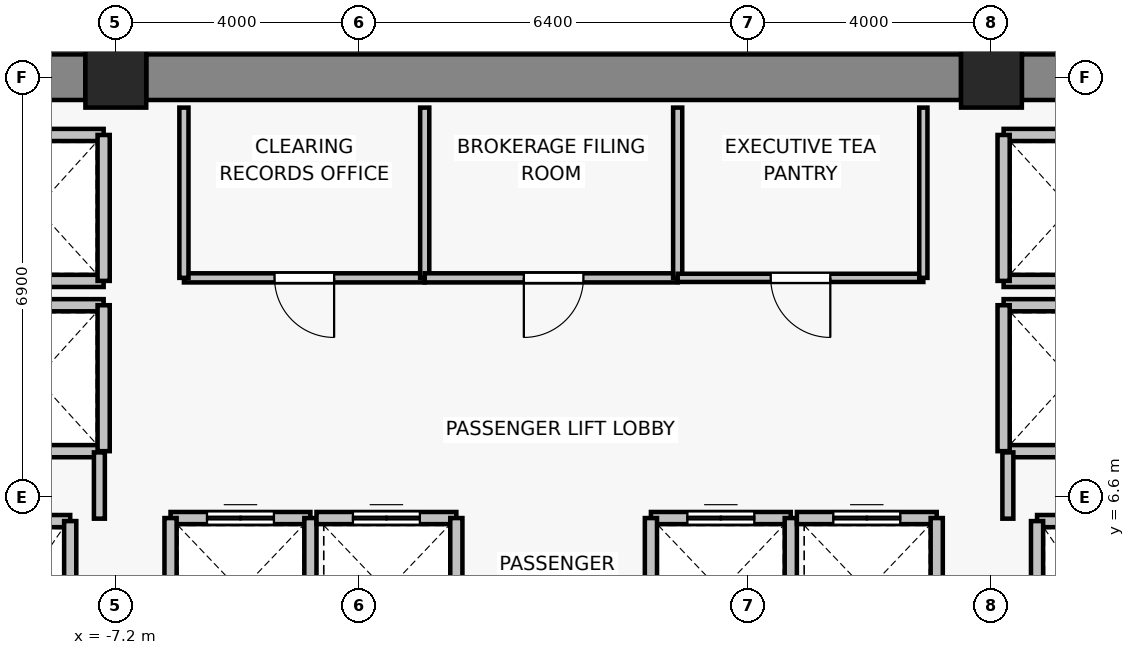
"""IFC4 building model, lengths in metres.
Left out: names, types, materials, properties, quantities, classifications, styles, units other than length and angle.
Written with IfcOpenShell. Run it as: python <this file> out.ifc"""

import sys

from ifc_helpers import new_model, si_unit, direction, frame, frame_2d, origin, origin_2d, place, context, subcontext, project, spatial, rectangle, extrude, source, transform, mapped, element, fill, save


model = new_model("IFC4")
c1 = context("Model", 3, precision=1e-05, world=origin(), true_north=direction((0.0, 1.0)))
c2 = subcontext(c1, "Body", "Model", "MODEL_VIEW")
j1 = project(units=[si_unit("LENGTHUNIT", "METRE"), si_unit("PLANEANGLEUNIT", "RADIAN")], contexts=[c1])
p1 = place(None, origin())
s1 = spatial("IfcSite", under=j1, at=p1, CompositionType="ELEMENT")
p2 = place(p1, origin())
s2 = spatial("IfcBuilding", under=s1, at=p2, CompositionType="ELEMENT")
p3 = place(p2, frame((0.0, 0.0, 119.8)))
s3 = spatial("IfcBuildingStorey", under=s2, at=p3, CompositionType="ELEMENT", Elevation=119.8)
for number, where, z_axis, x_axis in (
    (1, (-7.2, 13.5, 0.0), (0.0, 0.0, 1.0), (1.0, 0.0, 0.0)),
    (2, (7.2, 13.5, 0.0), (0.0, 0.0, 1.0), (1.0, 0.0, 0.0)),
):
    element("IfcColumn", number, at=place(p3, frame(where, z_axis=z_axis, x_axis=x_axis)), inside=s3, PredefinedType="COLUMN", context=c2, shape_type="SweptSolid", body=[
        extrude(rectangle(XDim=1.0, YDim=1.0, at=origin_2d()), origin(), (0.0, 0.0, 1.0), 3.3),
    ])
p4 = place(p3, frame((-13.9, 13.5, 0.0), z_axis=(0.0, 0.0, 1.0), x_axis=(1.0, 0.0, 0.0)))
e3 = element("IfcWall", 3, at=p4, inside=s3, PredefinedType="SHEAR", context=c2, shape_type="SweptSolid", body=[
    extrude(rectangle(XDim=6.2, YDim=0.75, at=frame_2d((3.1, 0.0))), origin(), (0.0, 0.0, 1.0), 3.075),
])
p5 = place(p3, frame((-6.7, 13.5, 0.0), z_axis=(0.0, 0.0, 1.0), x_axis=(1.0, 0.0, 0.0)))
e4 = element("IfcWall", 4, at=p5, inside=s3, PredefinedType="SHEAR", context=c2, shape_type="SweptSolid", body=[
    extrude(rectangle(XDim=13.4, YDim=0.75, at=frame_2d((6.7, 0.0))), origin(), (0.0, 0.0, 1.0), 3.075),
])
p6 = place(p3, frame((7.7, 13.5, 0.0), z_axis=(0.0, 0.0, 1.0), x_axis=(1.0, 0.0, 0.0)))
e5 = element("IfcWall", 5, at=p6, inside=s3, PredefinedType="SHEAR", context=c2, shape_type="SweptSolid", body=[
    extrude(rectangle(XDim=6.2, YDim=0.75, at=frame_2d((3.1, 0.0))), origin(), (0.0, 0.0, 1.0), 3.075),
])
p7 = place(p3, frame((-9.95, 6.2, 0.0), z_axis=(0.0, 0.0, 1.0), x_axis=(1.0, 0.0, 0.0)))
e6 = element("IfcWall", 6, at=p7, inside=s3, PredefinedType="SOLIDWALL", context=c2, shape_type="SweptSolid", body=[
    extrude(rectangle(XDim=2.0, YDim=0.2, at=frame_2d((1.0, 0.0))), origin(), (0.0, 0.0, 1.0), 3.075),
])
p8 = place(p3, frame((-7.95, 6.2, 0.0), z_axis=(0.0, 0.0, 1.0), x_axis=(0.0, -1.0, 0.0)))
e7 = element("IfcWall", 7, at=p8, inside=s3, PredefinedType="SOLIDWALL", context=c2, shape_type="SweptSolid", body=[
    extrude(rectangle(XDim=2.8, YDim=0.2, at=frame_2d((1.4, 0.0))), origin(), (0.0, 0.0, 1.0), 3.075),
])
p9 = place(p3, frame((7.95, 6.2, 0.0), z_axis=(0.0, 0.0, 1.0), x_axis=(1.0, 0.0, 0.0)))
e8 = element("IfcWall", 8, at=p9, inside=s3, PredefinedType="SOLIDWALL", context=c2, shape_type="SweptSolid", body=[
    extrude(rectangle(XDim=2.0, YDim=0.2, at=frame_2d((1.0, 0.0))), origin(), (0.0, 0.0, 1.0), 3.075),
])
p10 = place(p3, frame((7.95, 3.4, 0.0), z_axis=(0.0, 0.0, 1.0), x_axis=(0.0, 1.0, 0.0)))
e9 = element("IfcWall", 9, at=p10, inside=s3, PredefinedType="SOLIDWALL", context=c2, shape_type="SweptSolid", body=[
    extrude(rectangle(XDim=2.8, YDim=0.2, at=frame_2d((1.4, 0.0))), origin(), (0.0, 0.0, 1.0), 3.075),
])
p11 = place(p3, frame((-6.3, 6.25, 0.0), z_axis=(0.0, 0.0, 1.0), x_axis=(1.0, 0.0, 0.0)))
e10 = element("IfcWall", 10, at=p11, inside=s3, PredefinedType="SOLIDWALL", context=c2, shape_type="SweptSolid", body=[
    extrude(rectangle(XDim=2.3, YDim=0.2, at=frame_2d((1.15, 0.0))), origin(), (0.0, 0.0, 1.0), 3.075),
])
p12 = place(p11, frame((0.6, 0.0, 0.0)))
e11 = element("IfcOpeningElement", 11, at=p12, cuts=e10, PredefinedType="OPENING", context=c2, shape_type="SweptSolid", body=[
    extrude(rectangle(XDim=1.1, YDim=2.2, at=frame_2d((0.55, 1.1))), frame((0.0, 0.11, 0.0), z_axis=(0.0, -1.0, 0.0), x_axis=(1.0, 0.0, 0.0)), (0.0, 0.0, 1.0), 0.22),
])
for number, where, z_axis, x_axis in (
    (12, (-6.3, 3.85, 0.0), (0.0, 0.0, 1.0), (0.0, 1.0, 0.0)),
    (13, (-4.0, 6.25, 0.0), (0.0, 0.0, 1.0), (0.0, -1.0, 0.0)),
):
    element("IfcWall", number, at=place(p3, frame(where, z_axis=z_axis, x_axis=x_axis)), inside=s3, PredefinedType="SOLIDWALL", context=c2, shape_type="SweptSolid", body=[
        extrude(rectangle(XDim=2.4, YDim=0.2, at=frame_2d((1.2, 0.0))), origin(), (0.0, 0.0, 1.0), 3.075),
    ])
p13 = place(p3, frame((-3.9, 6.25, 0.0), z_axis=(0.0, 0.0, 1.0), x_axis=(1.0, 0.0, 0.0)))
e14 = element("IfcWall", 14, at=p13, inside=s3, PredefinedType="SOLIDWALL", context=c2, shape_type="SweptSolid", body=[
    extrude(rectangle(XDim=2.3, YDim=0.2, at=frame_2d((1.15, 0.0))), origin(), (0.0, 0.0, 1.0), 3.075),
])
p14 = place(p13, frame((0.6, 0.0, 0.0)))
e15 = element("IfcOpeningElement", 15, at=p14, cuts=e14, PredefinedType="OPENING", context=c2, shape_type="SweptSolid", body=[
    extrude(rectangle(XDim=1.1, YDim=2.2, at=frame_2d((0.55, 1.1))), frame((0.0, 0.11, 0.0), z_axis=(0.0, -1.0, 0.0), x_axis=(1.0, 0.0, 0.0)), (0.0, 0.0, 1.0), 0.22),
])
p15 = place(p3, frame((-1.6, 6.25, 0.0), z_axis=(0.0, 0.0, 1.0), x_axis=(0.0, -1.0, 0.0)))
e16 = element("IfcWall", 16, at=p15, inside=s3, PredefinedType="SOLIDWALL", context=c2, shape_type="SweptSolid", body=[
    extrude(rectangle(XDim=2.4, YDim=0.2, at=frame_2d((1.2, 0.0))), origin(), (0.0, 0.0, 1.0), 3.075),
])
p16 = place(p3, frame((1.6, 6.25, 0.0), z_axis=(0.0, 0.0, 1.0), x_axis=(1.0, 0.0, 0.0)))
e17 = element("IfcWall", 17, at=p16, inside=s3, PredefinedType="SOLIDWALL", context=c2, shape_type="SweptSolid", body=[
    extrude(rectangle(XDim=2.3, YDim=0.2, at=frame_2d((1.15, 0.0))), origin(), (0.0, 0.0, 1.0), 3.075),
])
p17 = place(p16, frame((0.6, 0.0, 0.0)))
e18 = element("IfcOpeningElement", 18, at=p17, cuts=e17, PredefinedType="OPENING", context=c2, shape_type="SweptSolid", body=[
    extrude(rectangle(XDim=1.1, YDim=2.2, at=frame_2d((0.55, 1.1))), frame((0.0, 0.11, 0.0), z_axis=(0.0, -1.0, 0.0), x_axis=(1.0, 0.0, 0.0)), (0.0, 0.0, 1.0), 0.22),
])
for number, where, z_axis, x_axis in (
    (19, (1.6, 3.85, 0.0), (0.0, 0.0, 1.0), (0.0, 1.0, 0.0)),
    (20, (3.9, 6.25, 0.0), (0.0, 0.0, 1.0), (0.0, -1.0, 0.0)),
):
    element("IfcWall", number, at=place(p3, frame(where, z_axis=z_axis, x_axis=x_axis)), inside=s3, PredefinedType="SOLIDWALL", context=c2, shape_type="SweptSolid", body=[
        extrude(rectangle(XDim=2.4, YDim=0.2, at=frame_2d((1.2, 0.0))), origin(), (0.0, 0.0, 1.0), 3.075),
    ])
p18 = place(p3, frame((4.0, 6.25, 0.0), z_axis=(0.0, 0.0, 1.0), x_axis=(1.0, 0.0, 0.0)))
e21 = element("IfcWall", 21, at=p18, inside=s3, PredefinedType="SOLIDWALL", context=c2, shape_type="SweptSolid", body=[
    extrude(rectangle(XDim=2.3, YDim=0.2, at=frame_2d((1.15, 0.0))), origin(), (0.0, 0.0, 1.0), 3.075),
])
p19 = place(p18, frame((0.6, 0.0, 0.0)))
e22 = element("IfcOpeningElement", 22, at=p19, cuts=e21, PredefinedType="OPENING", context=c2, shape_type="SweptSolid", body=[
    extrude(rectangle(XDim=1.1, YDim=2.2, at=frame_2d((0.55, 1.1))), frame((0.0, 0.11, 0.0), z_axis=(0.0, -1.0, 0.0), x_axis=(1.0, 0.0, 0.0)), (0.0, 0.0, 1.0), 0.22),
])
p20 = place(p3, frame((6.3, 6.25, 0.0), z_axis=(0.0, 0.0, 1.0), x_axis=(0.0, -1.0, 0.0)))
e23 = element("IfcWall", 23, at=p20, inside=s3, PredefinedType="SOLIDWALL", context=c2, shape_type="SweptSolid", body=[
    extrude(rectangle(XDim=2.4, YDim=0.2, at=frame_2d((1.2, 0.0))), origin(), (0.0, 0.0, 1.0), 3.075),
])
for number, where, z_axis, x_axis in (
    (24, (-7.4, 7.35, 0.0), (0.0, 0.0, 1.0), (-1.0, 0.0, 0.0)),
    (25, (-9.6, 9.75, 0.0), (0.0, 0.0, 1.0), (1.0, 0.0, 0.0)),
):
    element("IfcWall", number, at=place(p3, frame(where, z_axis=z_axis, x_axis=x_axis)), inside=s3, PredefinedType="SOLIDWALL", context=c2, shape_type="SweptSolid", body=[
        extrude(rectangle(XDim=2.2, YDim=0.2, at=frame_2d((1.1, 0.0))), origin(), (0.0, 0.0, 1.0), 2.515),
    ])
p21 = place(p3, frame((-7.4, 9.75, 0.0), z_axis=(0.0, 0.0, 1.0), x_axis=(0.0, -1.0, 0.0)))
e26 = element("IfcWall", 26, at=p21, inside=s3, PredefinedType="SOLIDWALL", context=c2, shape_type="SweptSolid", body=[
    extrude(rectangle(XDim=2.4, YDim=0.2, at=frame_2d((1.2, 0.0))), origin(), (0.0, 0.0, 1.0), 2.515),
])
for number, where, z_axis, x_axis in (
    (27, (-7.4, 10.15, 0.0), (0.0, 0.0, 1.0), (-1.0, 0.0, 0.0)),
    (28, (-9.6, 12.55, 0.0), (0.0, 0.0, 1.0), (1.0, 0.0, 0.0)),
):
    element("IfcWall", number, at=place(p3, frame(where, z_axis=z_axis, x_axis=x_axis)), inside=s3, PredefinedType="SOLIDWALL", context=c2, shape_type="SweptSolid", body=[
        extrude(rectangle(XDim=2.2, YDim=0.2, at=frame_2d((1.1, 0.0))), origin(), (0.0, 0.0, 1.0), 2.515),
    ])
p22 = place(p3, frame((-7.4, 12.55, 0.0), z_axis=(0.0, 0.0, 1.0), x_axis=(0.0, -1.0, 0.0)))
e29 = element("IfcWall", 29, at=p22, inside=s3, PredefinedType="SOLIDWALL", context=c2, shape_type="SweptSolid", body=[
    extrude(rectangle(XDim=2.4, YDim=0.2, at=frame_2d((1.2, 0.0))), origin(), (0.0, 0.0, 1.0), 2.515),
])
for number, where, z_axis, x_axis in (
    (30, (9.6, 7.35, 0.0), (0.0, 0.0, 1.0), (-1.0, 0.0, 0.0)),
    (31, (7.4, 9.75, 0.0), (0.0, 0.0, 1.0), (1.0, 0.0, 0.0)),
):
    element("IfcWall", number, at=place(p3, frame(where, z_axis=z_axis, x_axis=x_axis)), inside=s3, PredefinedType="SOLIDWALL", context=c2, shape_type="SweptSolid", body=[
        extrude(rectangle(XDim=2.2, YDim=0.2, at=frame_2d((1.1, 0.0))), origin(), (0.0, 0.0, 1.0), 2.515),
    ])
p23 = place(p3, frame((7.4, 7.35, 0.0), z_axis=(0.0, 0.0, 1.0), x_axis=(0.0, 1.0, 0.0)))
e32 = element("IfcWall", 32, at=p23, inside=s3, PredefinedType="SOLIDWALL", context=c2, shape_type="SweptSolid", body=[
    extrude(rectangle(XDim=2.4, YDim=0.2, at=frame_2d((1.2, 0.0))), origin(), (0.0, 0.0, 1.0), 2.515),
])
for number, where, z_axis, x_axis in (
    (33, (9.6, 10.15, 0.0), (0.0, 0.0, 1.0), (-1.0, 0.0, 0.0)),
    (34, (7.4, 12.55, 0.0), (0.0, 0.0, 1.0), (1.0, 0.0, 0.0)),
):
    element("IfcWall", number, at=place(p3, frame(where, z_axis=z_axis, x_axis=x_axis)), inside=s3, PredefinedType="SOLIDWALL", context=c2, shape_type="SweptSolid", body=[
        extrude(rectangle(XDim=2.2, YDim=0.2, at=frame_2d((1.1, 0.0))), origin(), (0.0, 0.0, 1.0), 2.515),
    ])
p24 = place(p3, frame((7.4, 10.15, 0.0), z_axis=(0.0, 0.0, 1.0), x_axis=(0.0, 1.0, 0.0)))
e35 = element("IfcWall", 35, at=p24, inside=s3, PredefinedType="SOLIDWALL", context=c2, shape_type="SweptSolid", body=[
    extrude(rectangle(XDim=2.4, YDim=0.2, at=frame_2d((1.2, 0.0))), origin(), (0.0, 0.0, 1.0), 2.515),
])
for number, where, z_axis, x_axis in (
    (36, (-7.47, 7.33, 0.0), (0.0, 0.0, 1.0), (0.0, -1.0, 0.0)),
    (37, (7.47, 6.24, 0.0), (0.0, 0.0, 1.0), (0.0, 1.0, 0.0)),
):
    element("IfcWall", number, at=place(p3, frame(where, z_axis=z_axis, x_axis=x_axis)), inside=s3, PredefinedType="PARTITIONING", context=c2, shape_type="SweptSolid", body=[
        extrude(rectangle(XDim=1.09, YDim=0.18, at=frame_2d((0.545, 0.0))), origin(), (0.0, 0.0, 1.0), 2.515),
    ])
p25 = place(p3, frame((-2.12, 10.2, 0.0), z_axis=(0.0, 0.0, 1.0), x_axis=(-1.0, 0.0, 0.0)))
e38 = element("IfcWall", 38, at=p25, inside=s3, PredefinedType="PARTITIONING", context=c2, shape_type="SweptSolid", body=[
    extrude(rectangle(XDim=3.96, YDim=0.15, at=frame_2d((1.98, 0.0))), origin(), (0.0, 0.0, 1.0), 3.075),
])
p26 = place(p25, frame((1.49, 0.0, 0.0)))
e39 = element("IfcOpeningElement", 39, at=p26, cuts=e38, PredefinedType="OPENING", context=c2, shape_type="SweptSolid", body=[
    extrude(rectangle(XDim=0.98, YDim=2.15, at=frame_2d((0.49, 1.075))), frame((0.0, 0.085, 0.0), z_axis=(0.0, -1.0, 0.0), x_axis=(1.0, 0.0, 0.0)), (0.0, 0.0, 1.0), 0.17),
])
for number, where, z_axis, x_axis in (
    (40, (-6.08, 10.2, 0.0), (0.0, 0.0, 1.0), (0.0, 1.0, 0.0)),
    (41, (-2.12, 13.0, 0.0), (0.0, 0.0, 1.0), (0.0, -1.0, 0.0)),
):
    element("IfcWall", number, at=place(p3, frame(where, z_axis=z_axis, x_axis=x_axis)), inside=s3, PredefinedType="PARTITIONING", context=c2, shape_type="SweptSolid", body=[
        extrude(rectangle(XDim=2.8, YDim=0.15, at=frame_2d((1.4, 0.0))), origin(), (0.0, 0.0, 1.0), 3.075),
    ])
p27 = place(p3, frame((2.04, 10.2, 0.0), z_axis=(0.0, 0.0, 1.0), x_axis=(-1.0, 0.0, 0.0)))
e42 = element("IfcWall", 42, at=p27, inside=s3, PredefinedType="PARTITIONING", context=c2, shape_type="SweptSolid", body=[
    extrude(rectangle(XDim=4.16, YDim=0.15, at=frame_2d((2.08, 0.0))), origin(), (0.0, 0.0, 1.0), 3.075),
])
p28 = place(p27, frame((1.55, 0.0, 0.0)))
e43 = element("IfcOpeningElement", 43, at=p28, cuts=e42, PredefinedType="OPENING", context=c2, shape_type="SweptSolid", body=[
    extrude(rectangle(XDim=0.98, YDim=2.15, at=frame_2d((0.49, 1.075))), frame((0.0, 0.085, 0.0), z_axis=(0.0, -1.0, 0.0), x_axis=(1.0, 0.0, 0.0)), (0.0, 0.0, 1.0), 0.17),
])
p29 = place(p3, frame((2.04, 13.0, 0.0), z_axis=(0.0, 0.0, 1.0), x_axis=(0.0, -1.0, 0.0)))
e44 = element("IfcWall", 44, at=p29, inside=s3, PredefinedType="PARTITIONING", context=c2, shape_type="SweptSolid", body=[
    extrude(rectangle(XDim=2.8, YDim=0.15, at=frame_2d((1.4, 0.0))), origin(), (0.0, 0.0, 1.0), 3.075),
])
p30 = place(p3, frame((6.08, 10.2, 0.0), z_axis=(0.0, 0.0, 1.0), x_axis=(-1.0, 0.0, 0.0)))
e45 = element("IfcWall", 45, at=p30, inside=s3, PredefinedType="PARTITIONING", context=c2, shape_type="SweptSolid", body=[
    extrude(rectangle(XDim=4.04, YDim=0.135, at=frame_2d((2.02, 0.0))), origin(), (0.0, 0.0, 1.0), 3.075),
])
p31 = place(p30, frame((1.53, 0.0, 0.0)))
e46 = element("IfcOpeningElement", 46, at=p31, cuts=e45, PredefinedType="OPENING", context=c2, shape_type="SweptSolid", body=[
    extrude(rectangle(XDim=0.98, YDim=2.15, at=frame_2d((0.49, 1.075))), frame((0.0, 0.077, 0.0), z_axis=(0.0, -1.0, 0.0), x_axis=(1.0, 0.0, 0.0)), (0.0, 0.0, 1.0), 0.155),
])
p32 = place(p3, frame((6.08, 13.0, 0.0), z_axis=(0.0, 0.0, 1.0), x_axis=(0.0, -1.0, 0.0)))
e47 = element("IfcWall", 47, at=p32, inside=s3, PredefinedType="PARTITIONING", context=c2, shape_type="SweptSolid", body=[
    extrude(rectangle(XDim=2.8, YDim=0.135, at=frame_2d((1.4, 0.0))), origin(), (0.0, 0.0, 1.0), 3.075),
])
m1 = source(origin(), c2, "Body", "SweptSolid", [
    extrude(rectangle(XDim=1.1, YDim=2.2, at=frame_2d((0.55, 1.1))), frame((0.0, 0.025, 0.0), z_axis=(0.0, -1.0, 0.0), x_axis=(1.0, 0.0, 0.0)), (0.0, 0.0, 1.0), 0.05),
])
p33 = place(p12, origin())
e48 = element("IfcDoor", 48, at=p33, inside=s3, OperationType="DOUBLE_DOOR_SLIDING", PredefinedType="DOOR", context=c2, shape_type="MappedRepresentation", body=[
    mapped(m1, transform((0.0, 0.0, 0.0), x_axis=(1.0, 0.0, 0.0), y_axis=(0.0, 1.0, 0.0), z_axis=(0.0, 0.0, 1.0), scale=1.0)),
])
fill(e11, e48)
p34 = place(p14, origin())
e49 = element("IfcDoor", 49, at=p34, inside=s3, OperationType="DOUBLE_DOOR_SLIDING", PredefinedType="DOOR", context=c2, shape_type="MappedRepresentation", body=[
    mapped(m1, transform((0.0, 0.0, 0.0), x_axis=(1.0, 0.0, 0.0), y_axis=(0.0, 1.0, 0.0), z_axis=(0.0, 0.0, 1.0), scale=1.0)),
])
fill(e15, e49)
p35 = place(p17, origin())
e50 = element("IfcDoor", 50, at=p35, inside=s3, OperationType="DOUBLE_DOOR_SLIDING", PredefinedType="DOOR", context=c2, shape_type="MappedRepresentation", body=[
    mapped(m1, transform((0.0, 0.0, 0.0), x_axis=(1.0, 0.0, 0.0), y_axis=(0.0, 1.0, 0.0), z_axis=(0.0, 0.0, 1.0), scale=1.0)),
])
fill(e18, e50)
p36 = place(p19, origin())
e51 = element("IfcDoor", 51, at=p36, inside=s3, OperationType="DOUBLE_DOOR_SLIDING", PredefinedType="DOOR", context=c2, shape_type="MappedRepresentation", body=[
    mapped(m1, transform((0.0, 0.0, 0.0), x_axis=(1.0, 0.0, 0.0), y_axis=(0.0, 1.0, 0.0), z_axis=(0.0, 0.0, 1.0), scale=1.0)),
])
fill(e22, e51)
m2 = source(origin(), c2, "Body", "SweptSolid", [
    extrude(rectangle(XDim=0.98, YDim=2.15, at=frame_2d((0.49, 1.075))), frame((0.0, 0.025, 0.0), z_axis=(0.0, -1.0, 0.0), x_axis=(1.0, 0.0, 0.0)), (0.0, 0.0, 1.0), 0.05),
])
p37 = place(p26, origin())
e52 = element("IfcDoor", 52, at=p37, inside=s3, OperationType="SINGLE_SWING_LEFT", PredefinedType="DOOR", context=c2, shape_type="MappedRepresentation", body=[
    mapped(m2, transform((0.0, 0.0, 0.0), x_axis=(1.0, 0.0, 0.0), y_axis=(0.0, 1.0, 0.0), z_axis=(0.0, 0.0, 1.0), scale=1.0)),
])
fill(e39, e52)
p38 = place(p28, origin())
e53 = element("IfcDoor", 53, at=p38, inside=s3, OperationType="SINGLE_SWING_RIGHT", PredefinedType="DOOR", context=c2, shape_type="MappedRepresentation", body=[
    mapped(m2, transform((0.0, 0.0, 0.0), x_axis=(1.0, 0.0, 0.0), y_axis=(0.0, 1.0, 0.0), z_axis=(0.0, 0.0, 1.0), scale=1.0)),
])
fill(e43, e53)
p39 = place(p31, origin())
e54 = element("IfcDoor", 54, at=p39, inside=s3, OperationType="SINGLE_SWING_LEFT", PredefinedType="DOOR", context=c2, shape_type="MappedRepresentation", body=[
    mapped(m2, transform((0.0, 0.0, 0.0), x_axis=(1.0, 0.0, 0.0), y_axis=(0.0, 1.0, 0.0), z_axis=(0.0, 0.0, 1.0), scale=1.0)),
])
fill(e46, e54)
save(model, sys.argv[1])
